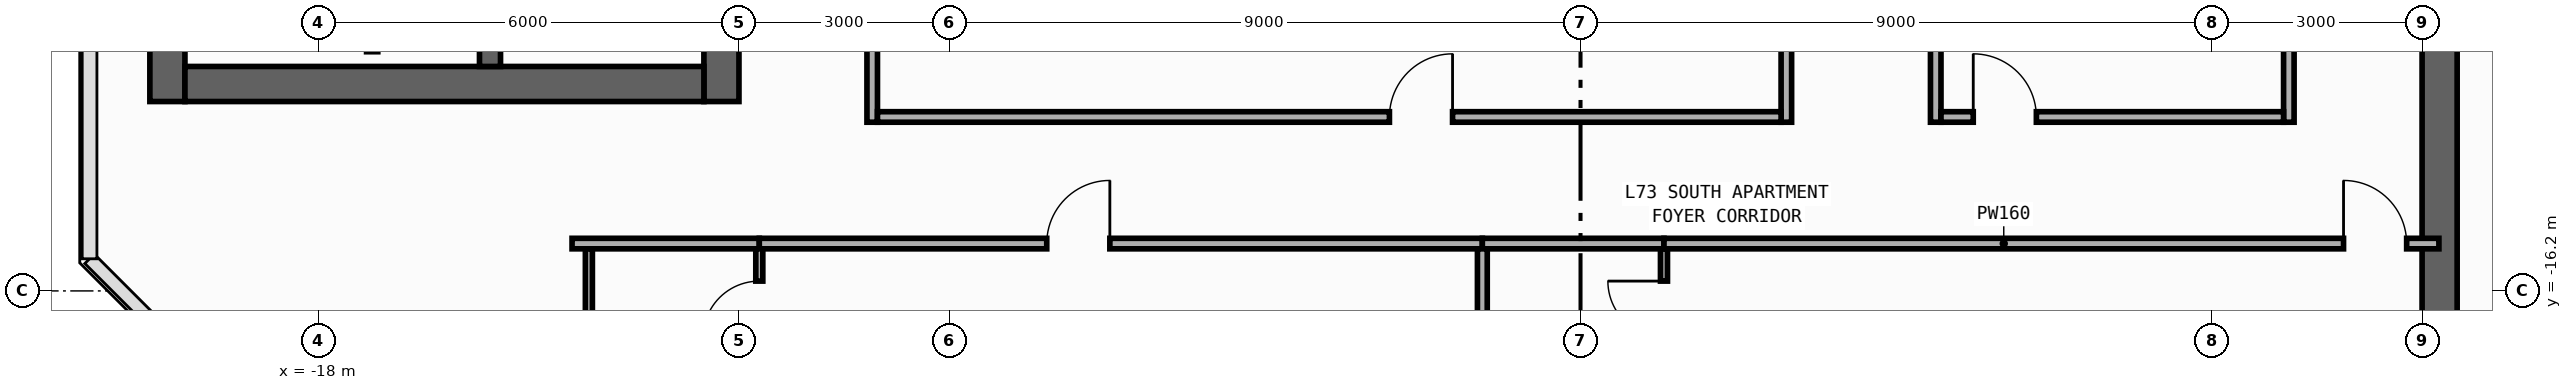
"""IFC4 building model, lengths in metres.
Left out: names, types, materials, properties, quantities, classifications, styles, units other than length and angle.
Written with IfcOpenShell. Run it as: python <this file> out.ifc"""

import sys

from ifc_helpers import new_model, si_unit, direction, frame, frame_2d, origin, place, context, subcontext, project, spatial, rectangle, extrude, element, fill, save


model = new_model("IFC4")
c1 = context("Model", 3, precision=1e-05, world=origin(), true_north=direction((0.0, 1.0)))
c2 = subcontext(c1, "Body", "Model", "MODEL_VIEW")
j1 = project(units=[si_unit("LENGTHUNIT", "METRE"), si_unit("PLANEANGLEUNIT", "RADIAN")], contexts=[c1])
p1 = place(None, origin())
s1 = spatial("IfcSite", under=j1, at=p1, CompositionType="ELEMENT")
p2 = place(p1, origin())
s2 = spatial("IfcBuilding", under=s1, at=p2, CompositionType="ELEMENT")
p3 = place(p2, frame((0.0, 0.0, 304.2)))
s3 = spatial("IfcBuildingStorey", under=s2, at=p3, CompositionType="ELEMENT", Elevation=304.2)
p4 = place(p3, frame((-20.15, -13.5, 0.0), z_axis=(0.0, 0.0, 1.0), x_axis=(0.0, 1.0, 0.0)))
e1 = element("IfcWall", 1, at=p4, inside=s3, PredefinedType="SHEAR", context=c2, shape_type="SweptSolid", body=[
    extrude(rectangle(XDim=27.0, YDim=0.5, at=frame_2d((13.5, 0.0))), origin(), (0.0, 0.0, 1.0), 3.54),
])
p5 = place(p3, frame((-12.25, -13.5, 0.0), z_axis=(0.0, 0.0, 1.0), x_axis=(0.0, 1.0, 0.0)))
e2 = element("IfcWall", 2, at=p5, inside=s3, PredefinedType="SHEAR", context=c2, shape_type="SweptSolid", body=[
    extrude(rectangle(XDim=27.0, YDim=0.5, at=frame_2d((13.5, 0.0))), origin(), (0.0, 0.0, 1.0), 3.54),
])
p6 = place(p5, frame((15.175, 0.0, 0.0)))
e3 = element("IfcOpeningElement", 3, at=p6, cuts=e2, PredefinedType="OPENING", context=c2, shape_type="SweptSolid", body=[
    extrude(rectangle(XDim=0.85, YDim=2.1, at=frame_2d((0.425, 1.05))), frame((0.0, 0.26, 0.0), z_axis=(0.0, -1.0, 0.0), x_axis=(1.0, 0.0, 0.0)), (0.0, 0.0, 1.0), 0.52),
])
p7 = place(p5, frame((21.275, 0.0, 0.0)))
e4 = element("IfcOpeningElement", 4, at=p7, cuts=e2, PredefinedType="OPENING", context=c2, shape_type="SweptSolid", body=[
    extrude(rectangle(XDim=0.85, YDim=2.1, at=frame_2d((0.425, 1.05))), frame((0.0, 0.26, 0.0), z_axis=(0.0, -1.0, 0.0), x_axis=(1.0, 0.0, 0.0)), (0.0, 0.0, 1.0), 0.52),
])
p8 = place(p5, frame((4.275, 0.0, 0.0)))
e5 = element("IfcOpeningElement", 5, at=p8, cuts=e2, PredefinedType="OPENING", context=c2, shape_type="SweptSolid", body=[
    extrude(rectangle(XDim=0.85, YDim=2.1, at=frame_2d((0.425, 1.05))), frame((0.0, 0.26, 0.0), z_axis=(0.0, -1.0, 0.0), x_axis=(1.0, 0.0, 0.0)), (0.0, 0.0, 1.0), 0.52),
])
p9 = place(p5, frame((10.275, 0.0, 0.0)))
e6 = element("IfcOpeningElement", 6, at=p9, cuts=e2, PredefinedType="OPENING", context=c2, shape_type="SweptSolid", body=[
    extrude(rectangle(XDim=0.85, YDim=2.1, at=frame_2d((0.425, 1.05))), frame((0.0, 0.26, 0.0), z_axis=(0.0, -1.0, 0.0), x_axis=(1.0, 0.0, 0.0)), (0.0, 0.0, 1.0), 0.52),
])
p10 = place(p5, frame((12.725, 0.0, 0.0)))
e7 = element("IfcOpeningElement", 7, at=p10, cuts=e2, PredefinedType="OPENING", context=c2, shape_type="SweptSolid", body=[
    extrude(rectangle(XDim=1.15, YDim=2.2, at=frame_2d((0.575, 1.1))), frame((0.0, 0.26, 0.0), z_axis=(0.0, -1.0, 0.0), x_axis=(1.0, 0.0, 0.0)), (0.0, 0.0, 1.0), 0.52),
])
p11 = place(p5, frame((1.625, 0.0, 0.0)))
e8 = element("IfcOpeningElement", 8, at=p11, cuts=e2, PredefinedType="OPENING", context=c2, shape_type="SweptSolid", body=[
    extrude(rectangle(XDim=0.85, YDim=2.1, at=frame_2d((0.425, 1.05))), frame((0.0, 0.26, 0.0), z_axis=(0.0, -1.0, 0.0), x_axis=(1.0, 0.0, 0.0)), (0.0, 0.0, 1.0), 0.52),
])
p12 = place(p3, frame((-19.9, -13.25, 0.0), z_axis=(0.0, 0.0, 1.0), x_axis=(1.0, 0.0, 0.0)))
e9 = element("IfcWall", 9, at=p12, inside=s3, PredefinedType="SHEAR", context=c2, shape_type="SweptSolid", body=[
    extrude(rectangle(XDim=7.4, YDim=0.5, at=frame_2d((3.7, 0.0))), origin(), (0.0, 0.0, 1.0), 3.54),
])
p13 = place(p3, frame((-15.55, -13.0, 0.0), z_axis=(0.0, 0.0, 1.0), x_axis=(0.0, 1.0, 0.0)))
e10 = element("IfcWall", 10, at=p13, inside=s3, PredefinedType="SHEAR", context=c2, shape_type="SweptSolid", body=[
    extrude(rectangle(XDim=26.0, YDim=0.3, at=frame_2d((13.0, 0.0))), origin(), (0.0, 0.0, 1.0), 3.54),
])
p14 = place(p13, frame((12.225, 0.0, 0.0)))
e11 = element("IfcOpeningElement", 11, at=p14, cuts=e10, PredefinedType="OPENING", context=c2, shape_type="SweptSolid", body=[
    extrude(rectangle(XDim=1.15, YDim=2.2, at=frame_2d((0.575, 1.1))), frame((0.0, 0.16, 0.0), z_axis=(0.0, -1.0, 0.0), x_axis=(1.0, 0.0, 0.0)), (0.0, 0.0, 1.0), 0.32),
])
p15 = place(p13, frame((1.125, 0.0, 0.0)))
e12 = element("IfcOpeningElement", 12, at=p15, cuts=e10, PredefinedType="OPENING", context=c2, shape_type="SweptSolid", body=[
    extrude(rectangle(XDim=0.85, YDim=2.1, at=frame_2d((0.425, 1.05))), frame((0.0, 0.16, 0.0), z_axis=(0.0, -1.0, 0.0), x_axis=(1.0, 0.0, 0.0)), (0.0, 0.0, 1.0), 0.32),
])
p16 = place(p3, frame((12.25, -19.8, 0.0), z_axis=(0.0, 0.0, 1.0), x_axis=(0.0, 1.0, 0.0)))
e13 = element("IfcWall", 13, at=p16, inside=s3, PredefinedType="SHEAR", context=c2, shape_type="SweptSolid", body=[
    extrude(rectangle(XDim=27.0, YDim=0.5, at=frame_2d((13.5, 0.0))), origin(), (0.0, 0.0, 1.0), 3.54),
])
p17 = place(p16, frame((23.05, 0.0, 0.0)))
e14 = element("IfcOpeningElement", 14, at=p17, cuts=e13, PredefinedType="OPENING", context=c2, shape_type="SweptSolid", body=[
    extrude(rectangle(XDim=1.1, YDim=2.2, at=frame_2d((0.55, 1.1))), frame((0.0, 0.26, 0.0), z_axis=(0.0, -1.0, 0.0), x_axis=(1.0, 0.0, 0.0)), (0.0, 0.0, 1.0), 0.52),
])
p18 = place(p16, frame((19.85, 0.0, 0.0)))
e15 = element("IfcOpeningElement", 15, at=p18, cuts=e13, PredefinedType="OPENING", context=c2, shape_type="SweptSolid", body=[
    extrude(rectangle(XDim=1.1, YDim=2.2, at=frame_2d((0.55, 1.1))), frame((0.0, 0.26, 0.0), z_axis=(0.0, -1.0, 0.0), x_axis=(1.0, 0.0, 0.0)), (0.0, 0.0, 1.0), 0.52),
])
p19 = place(p16, frame((16.65, 0.0, 0.0)))
e16 = element("IfcOpeningElement", 16, at=p19, cuts=e13, PredefinedType="OPENING", context=c2, shape_type="SweptSolid", body=[
    extrude(rectangle(XDim=1.1, YDim=2.2, at=frame_2d((0.55, 1.1))), frame((0.0, 0.26, 0.0), z_axis=(0.0, -1.0, 0.0), x_axis=(1.0, 0.0, 0.0)), (0.0, 0.0, 1.0), 0.52),
])
p20 = place(p16, frame((10.175, 0.0, 0.0)))
e17 = element("IfcOpeningElement", 17, at=p20, cuts=e13, PredefinedType="OPENING", context=c2, shape_type="SweptSolid", body=[
    extrude(rectangle(XDim=0.85, YDim=2.1, at=frame_2d((0.425, 1.05))), frame((0.0, 0.26, 0.0), z_axis=(0.0, -1.0, 0.0), x_axis=(1.0, 0.0, 0.0)), (0.0, 0.0, 1.0), 0.52),
])
p21 = place(p16, frame((12.725, 0.0, 0.0)))
e18 = element("IfcOpeningElement", 18, at=p21, cuts=e13, PredefinedType="OPENING", context=c2, shape_type="SweptSolid", body=[
    extrude(rectangle(XDim=1.15, YDim=2.2, at=frame_2d((0.575, 1.1))), frame((0.0, 0.26, 0.0), z_axis=(0.0, -1.0, 0.0), x_axis=(1.0, 0.0, 0.0)), (0.0, 0.0, 1.0), 0.52),
])
p22 = place(p16, frame((25.125, 0.0, 0.0)))
e19 = element("IfcOpeningElement", 19, at=p22, cuts=e13, PredefinedType="OPENING", context=c2, shape_type="SweptSolid", body=[
    extrude(rectangle(XDim=0.85, YDim=2.1, at=frame_2d((0.425, 1.05))), frame((0.0, 0.26, 0.0), z_axis=(0.0, -1.0, 0.0), x_axis=(1.0, 0.0, 0.0)), (0.0, 0.0, 1.0), 0.52),
])
p23 = place(p3, frame((-10.1, -13.795, 0.0), z_axis=(0.0, 0.0, 1.0), x_axis=(0.0, 1.0, 0.0)))
e20 = element("IfcWall", 20, at=p23, inside=s3, PredefinedType="PARTITIONING", context=c2, shape_type="SweptSolid", body=[
    extrude(rectangle(XDim=16.605, YDim=0.15, at=frame_2d((8.302, 0.0))), origin(), (0.0, 0.0, 1.0), 3.54),
])
p24 = place(p23, frame((7.954, 0.0, 0.0)))
e21 = element("IfcOpeningElement", 21, at=p24, cuts=e20, PredefinedType="OPENING", context=c2, shape_type="SweptSolid", body=[
    extrude(rectangle(XDim=0.9, YDim=2.15, at=frame_2d((0.45, 1.075))), frame((0.0, 0.085, 0.0), z_axis=(0.0, -1.0, 0.0), x_axis=(1.0, 0.0, 0.0)), (0.0, 0.0, 1.0), 0.17),
])
p25 = place(p3, frame((10.1, -13.795, 0.0), z_axis=(0.0, 0.0, 1.0), x_axis=(0.0, 1.0, 0.0)))
e22 = element("IfcWall", 22, at=p25, inside=s3, PredefinedType="PARTITIONING", context=c2, shape_type="SweptSolid", body=[
    extrude(rectangle(XDim=13.975, YDim=0.15, at=frame_2d((6.987, 0.0))), origin(), (0.0, 0.0, 1.0), 3.54),
])
p26 = place(p25, frame((7.956, 0.0, 0.0)))
e23 = element("IfcOpeningElement", 23, at=p26, cuts=e22, PredefinedType="OPENING", context=c2, shape_type="SweptSolid", body=[
    extrude(rectangle(XDim=0.9, YDim=2.15, at=frame_2d((0.45, 1.075))), frame((0.0, 0.085, 0.0), z_axis=(0.0, -1.0, 0.0), x_axis=(1.0, 0.0, 0.0)), (0.0, 0.0, 1.0), 0.17),
])
p27 = place(p3, frame((2.935, -13.795, 0.0), z_axis=(0.0, 0.0, 1.0), x_axis=(0.0, 1.0, 0.0)))
e24 = element("IfcWall", 24, at=p27, inside=s3, PredefinedType="PARTITIONING", context=c2, shape_type="SweptSolid", body=[
    extrude(rectangle(XDim=16.455, YDim=0.15, at=frame_2d((8.228, 0.0))), origin(), (0.0, 0.0, 1.0), 3.54),
])
p28 = place(p27, frame((7.878, 0.0, 0.0)))
e25 = element("IfcOpeningElement", 25, at=p28, cuts=e24, PredefinedType="OPENING", context=c2, shape_type="SweptSolid", body=[
    extrude(rectangle(XDim=0.9, YDim=2.15, at=frame_2d((0.45, 1.075))), frame((0.0, 0.085, 0.0), z_axis=(0.0, -1.0, 0.0), x_axis=(1.0, 0.0, 0.0)), (0.0, 0.0, 1.0), 0.17),
])
p29 = place(p3, frame((5.065, -13.795, 0.0), z_axis=(0.0, 0.0, 1.0), x_axis=(0.0, 1.0, 0.0)))
e26 = element("IfcWall", 26, at=p29, inside=s3, PredefinedType="PARTITIONING", context=c2, shape_type="SweptSolid", body=[
    extrude(rectangle(XDim=13.815, YDim=0.15, at=frame_2d((6.907, 0.0))), origin(), (0.0, 0.0, 1.0), 3.19),
])
p30 = place(p29, frame((7.982, 0.0, 0.0)))
e27 = element("IfcOpeningElement", 27, at=p30, cuts=e26, PredefinedType="OPENING", context=c2, shape_type="SweptSolid", body=[
    extrude(rectangle(XDim=0.9, YDim=2.15, at=frame_2d((0.45, 1.075))), frame((0.0, 0.085, 0.0), z_axis=(0.0, -1.0, 0.0), x_axis=(1.0, 0.0, 0.0)), (0.0, 0.0, 1.0), 0.17),
])
p31 = place(p3, frame((-14.38, -15.525, 0.0), z_axis=(0.0, 0.0, 1.0), x_axis=(1.0, 0.0, 0.0)))
e28 = element("IfcWall", 28, at=p31, inside=s3, PredefinedType="PARTITIONING", context=c2, shape_type="SweptSolid", body=[
    extrude(rectangle(XDim=2.67, YDim=0.15, at=frame_2d((1.335, 0.0))), origin(), (0.0, 0.0, 1.0), 3.54),
])
p32 = place(p3, frame((-11.71, -15.525, 0.0), z_axis=(0.0, 0.0, 1.0), x_axis=(1.0, 0.0, 0.0)))
e29 = element("IfcWall", 29, at=p32, inside=s3, PredefinedType="PARTITIONING", context=c2, shape_type="SweptSolid", body=[
    extrude(rectangle(XDim=10.31, YDim=0.15, at=frame_2d((5.155, 0.0))), origin(), (0.0, 0.0, 1.0), 3.54),
])
p33 = place(p32, frame((4.099, 0.0, 0.0)))
e30 = element("IfcOpeningElement", 30, at=p33, cuts=e29, PredefinedType="OPENING", context=c2, shape_type="SweptSolid", body=[
    extrude(rectangle(XDim=0.9, YDim=2.15, at=frame_2d((0.45, 1.075))), frame((0.0, 0.085, 0.0), z_axis=(0.0, -1.0, 0.0), x_axis=(1.0, 0.0, 0.0)), (0.0, 0.0, 1.0), 0.17),
])
p34 = place(p3, frame((-1.4, -15.525, 0.0), z_axis=(0.0, 0.0, 1.0), x_axis=(1.0, 0.0, 0.0)))
e31 = element("IfcWall", 31, at=p34, inside=s3, PredefinedType="PARTITIONING", context=c2, shape_type="SweptSolid", body=[
    extrude(rectangle(XDim=2.59, YDim=0.15, at=frame_2d((1.295, 0.0))), origin(), (0.0, 0.0, 1.0), 3.54),
])
p35 = place(p3, frame((1.19, -15.525, 0.0), z_axis=(0.0, 0.0, 1.0), x_axis=(1.0, 0.0, 0.0)))
e32 = element("IfcWall", 32, at=p35, inside=s3, PredefinedType="PARTITIONING", context=c2, shape_type="SweptSolid", body=[
    extrude(rectangle(XDim=11.05, YDim=0.15, at=frame_2d((5.525, 0.0))), origin(), (0.0, 0.0, 1.0), 3.54),
])
p36 = place(p35, frame((9.69, 0.0, 0.0)))
e33 = element("IfcOpeningElement", 33, at=p36, cuts=e32, PredefinedType="OPENING", context=c2, shape_type="SweptSolid", body=[
    extrude(rectangle(XDim=0.9, YDim=2.15, at=frame_2d((0.45, 1.075))), frame((0.0, 0.085, 0.0), z_axis=(0.0, -1.0, 0.0), x_axis=(1.0, 0.0, 0.0)), (0.0, 0.0, 1.0), 0.17),
])
p37 = place(p3, frame((-10.025, -13.72, 0.0), z_axis=(0.0, 0.0, 1.0), x_axis=(1.0, 0.0, 0.0)))
e34 = element("IfcWall", 34, at=p37, inside=s3, PredefinedType="PARTITIONING", context=c2, shape_type="SweptSolid", body=[
    extrude(rectangle(XDim=12.885, YDim=0.15, at=frame_2d((6.442, 0.0))), origin(), (0.0, 0.0, 1.0), 3.54),
])
p38 = place(p37, frame((7.3, 0.0, 0.0)))
e35 = element("IfcOpeningElement", 35, at=p38, cuts=e34, PredefinedType="OPENING", context=c2, shape_type="SweptSolid", body=[
    extrude(rectangle(XDim=0.9, YDim=2.15, at=frame_2d((0.45, 1.075))), frame((0.0, 0.085, 0.0), z_axis=(0.0, -1.0, 0.0), x_axis=(1.0, 0.0, 0.0)), (0.0, 0.0, 1.0), 0.17),
])
p39 = place(p3, frame((5.14, -13.72, 0.0), z_axis=(0.0, 0.0, 1.0), x_axis=(1.0, 0.0, 0.0)))
e36 = element("IfcWall", 36, at=p39, inside=s3, PredefinedType="PARTITIONING", context=c2, shape_type="SweptSolid", body=[
    extrude(rectangle(XDim=4.885, YDim=0.15, at=frame_2d((2.442, 0.0))), origin(), (0.0, 0.0, 1.0), 3.54),
])
p40 = place(p39, frame((0.46, 0.0, 0.0)))
e37 = element("IfcOpeningElement", 37, at=p40, cuts=e36, PredefinedType="OPENING", context=c2, shape_type="SweptSolid", body=[
    extrude(rectangle(XDim=0.9, YDim=2.15, at=frame_2d((0.45, 1.075))), frame((0.0, 0.085, 0.0), z_axis=(0.0, -1.0, 0.0), x_axis=(1.0, 0.0, 0.0)), (0.0, 0.0, 1.0), 0.17),
])
p41 = place(p3, frame((-11.71, -18.1, 0.0), z_axis=(0.0, 0.0, 1.0), x_axis=(0.0, 1.0, 0.0)))
e38 = element("IfcWall", 38, at=p41, inside=s3, PredefinedType="PARTITIONING", context=c2, shape_type="SweptSolid", body=[
    extrude(rectangle(XDim=2.5, YDim=0.1, at=frame_2d((1.25, 0.0))), origin(), (0.0, 0.0, 1.0), 3.54),
])
p42 = place(p41, frame((1.24, 0.0, 0.0)))
e39 = element("IfcOpeningElement", 39, at=p42, cuts=e38, PredefinedType="OPENING", context=c2, shape_type="SweptSolid", body=[
    extrude(rectangle(XDim=0.8, YDim=2.1, at=frame_2d((0.4, 1.05))), frame((0.0, 0.06, 0.0), z_axis=(0.0, -1.0, 0.0), x_axis=(1.0, 0.0, 0.0)), (0.0, 0.0, 1.0), 0.12),
])
p43 = place(p3, frame((-1.4, -18.1, 0.0), z_axis=(0.0, 0.0, 1.0), x_axis=(0.0, 1.0, 0.0)))
e40 = element("IfcWall", 40, at=p43, inside=s3, PredefinedType="PARTITIONING", context=c2, shape_type="SweptSolid", body=[
    extrude(rectangle(XDim=2.5, YDim=0.14, at=frame_2d((1.25, 0.0))), origin(), (0.0, 0.0, 1.0), 3.54),
])
p44 = place(p3, frame((1.19, -18.1, 0.0), z_axis=(0.0, 0.0, 1.0), x_axis=(0.0, 1.0, 0.0)))
e41 = element("IfcWall", 41, at=p44, inside=s3, PredefinedType="PARTITIONING", context=c2, shape_type="SweptSolid", body=[
    extrude(rectangle(XDim=2.5, YDim=0.1, at=frame_2d((1.25, 0.0))), origin(), (0.0, 0.0, 1.0), 3.54),
])
p45 = place(p44, frame((1.24, 0.0, 0.0)))
e42 = element("IfcOpeningElement", 42, at=p45, cuts=e41, PredefinedType="OPENING", context=c2, shape_type="SweptSolid", body=[
    extrude(rectangle(XDim=0.8, YDim=2.1, at=frame_2d((0.4, 1.05))), frame((0.0, 0.06, 0.0), z_axis=(0.0, -1.0, 0.0), x_axis=(1.0, 0.0, 0.0)), (0.0, 0.0, 1.0), 0.12),
])
p46 = place(p3, frame((-14.14, -18.05, 0.0), z_axis=(0.0, 0.0, 1.0), x_axis=(0.0, 1.0, 0.0)))
e43 = element("IfcWall", 43, at=p46, inside=s3, PredefinedType="PARTITIONING", context=c2, shape_type="SweptSolid", body=[
    extrude(rectangle(XDim=2.45, YDim=0.1, at=frame_2d((1.225, 0.0))), origin(), (0.0, 0.0, 1.0), 2.64),
])
p47 = place(p33, origin())
e44 = element("IfcDoor", 44, at=p47, inside=s3, OperationType="SINGLE_SWING_RIGHT", PredefinedType="DOOR", context=c2, shape_type="SweptSolid", body=[
    extrude(rectangle(XDim=0.9, YDim=2.15, at=frame_2d((0.45, 1.075))), frame((0.0, 0.025, 0.0), z_axis=(0.0, -1.0, 0.0), x_axis=(1.0, 0.0, 0.0)), (0.0, 0.0, 1.0), 0.05),
])
fill(e30, e44)
p48 = place(p36, origin())
e45 = element("IfcDoor", 45, at=p48, inside=s3, OperationType="SINGLE_SWING_LEFT", PredefinedType="DOOR", context=c2, shape_type="SweptSolid", body=[
    extrude(rectangle(XDim=0.9, YDim=2.15, at=frame_2d((0.45, 1.075))), frame((0.0, 0.025, 0.0), z_axis=(0.0, -1.0, 0.0), x_axis=(1.0, 0.0, 0.0)), (0.0, 0.0, 1.0), 0.05),
])
fill(e33, e45)
p49 = place(p38, origin())
e46 = element("IfcDoor", 46, at=p49, inside=s3, OperationType="SINGLE_SWING_RIGHT", PredefinedType="DOOR", context=c2, shape_type="SweptSolid", body=[
    extrude(rectangle(XDim=0.9, YDim=2.15, at=frame_2d((0.45, 1.075))), frame((0.0, 0.025, 0.0), z_axis=(0.0, -1.0, 0.0), x_axis=(1.0, 0.0, 0.0)), (0.0, 0.0, 1.0), 0.05),
])
fill(e35, e46)
p50 = place(p40, origin())
e47 = element("IfcDoor", 47, at=p50, inside=s3, OperationType="SINGLE_SWING_LEFT", PredefinedType="DOOR", context=c2, shape_type="SweptSolid", body=[
    extrude(rectangle(XDim=0.9, YDim=2.15, at=frame_2d((0.45, 1.075))), frame((0.0, 0.025, 0.0), z_axis=(0.0, -1.0, 0.0), x_axis=(1.0, 0.0, 0.0)), (0.0, 0.0, 1.0), 0.05),
])
fill(e37, e47)
p51 = place(p42, origin())
e48 = element("IfcDoor", 48, at=p51, inside=s3, OperationType="SINGLE_SWING_LEFT", PredefinedType="DOOR", context=c2, shape_type="SweptSolid", body=[
    extrude(rectangle(XDim=0.8, YDim=2.1, at=frame_2d((0.4, 1.05))), frame((0.0, 0.025, 0.0), z_axis=(0.0, -1.0, 0.0), x_axis=(1.0, 0.0, 0.0)), (0.0, 0.0, 1.0), 0.05),
])
fill(e39, e48)
p52 = place(p45, origin())
e49 = element("IfcDoor", 49, at=p52, inside=s3, OperationType="SINGLE_SWING_RIGHT", PredefinedType="DOOR", context=c2, shape_type="SweptSolid", body=[
    extrude(rectangle(XDim=0.8, YDim=2.1, at=frame_2d((0.4, 1.05))), frame((0.0, 0.025, 0.0), z_axis=(0.0, -1.0, 0.0), x_axis=(1.0, 0.0, 0.0)), (0.0, 0.0, 1.0), 0.05),
])
fill(e42, e49)
save(model, sys.argv[1])
